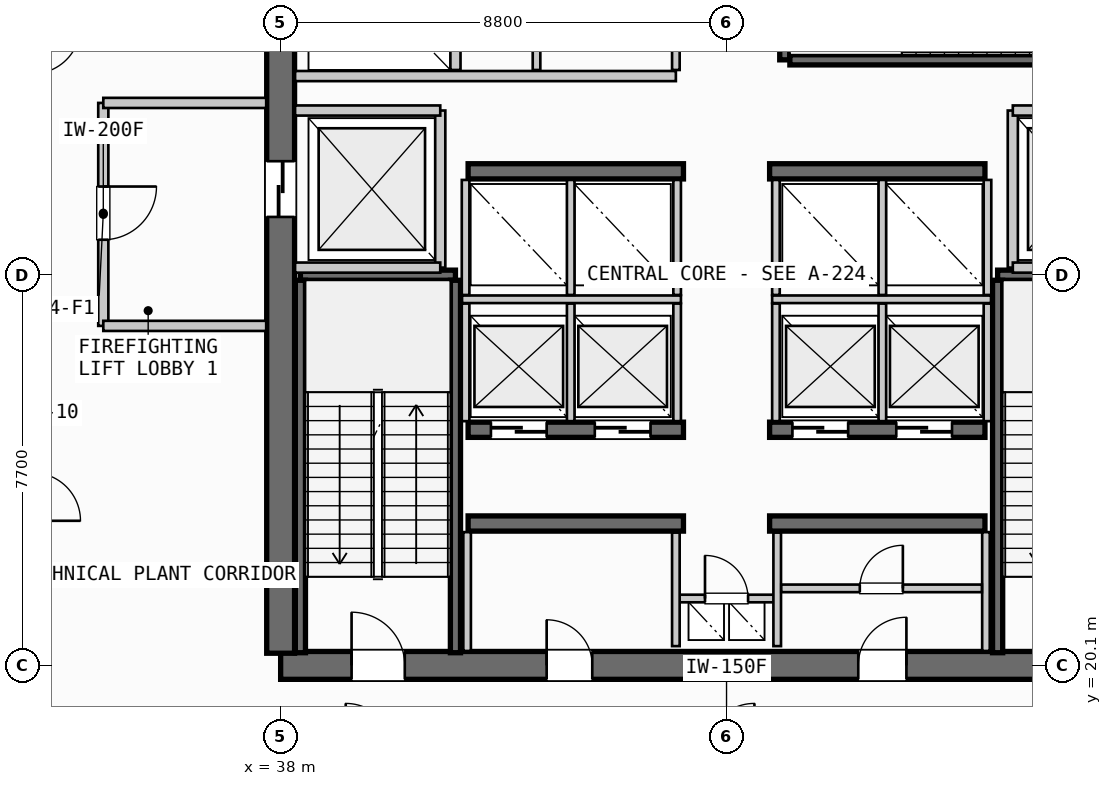
"""IFC4 building model, lengths in metres.
Left out: names, types, materials, properties, quantities, classifications, styles, units other than length and angle.
Written with IfcOpenShell. Run it as: python <this file> out.ifc"""

import sys

from ifc_helpers import new_model, si_unit, direction, frame, frame_2d, origin, place, context, subcontext, project, spatial, rectangle, extrude, source, transform, mapped, element, fill, save


model = new_model("IFC4")
c1 = context("Model", 3, precision=1e-05, world=origin(), true_north=direction((0.0, 1.0)))
c2 = subcontext(c1, "Body", "Model", "MODEL_VIEW")
j1 = project(units=[si_unit("LENGTHUNIT", "METRE"), si_unit("PLANEANGLEUNIT", "RADIAN")], contexts=[c1])
p1 = place(None, origin())
s1 = spatial("IfcSite", under=j1, at=p1, CompositionType="ELEMENT")
p2 = place(p1, origin())
s2 = spatial("IfcBuilding", under=s1, at=p2, CompositionType="ELEMENT")
p3 = place(p2, frame((0.0, 0.0, 171.4)))
s3 = spatial("IfcBuildingStorey", under=s2, at=p3, CompositionType="ELEMENT", Elevation=171.4)
p4 = place(p3, frame((38.0, 20.1, 0.0), z_axis=(0.0, 0.0, 1.0), x_axis=(1.0, 0.0, 0.0)))
e1 = element("IfcWall", 1, at=p4, inside=s3, PredefinedType="SHEAR", context=c2, shape_type="SweptSolid", body=[
    extrude(rectangle(XDim=17.6, YDim=0.55, at=frame_2d((8.8, 0.0))), origin(), (0.0, 0.0, 1.0), 4.58),
])
p5 = place(p4, frame((1.4, 0.0, 0.0)))
e2 = element("IfcOpeningElement", 2, at=p5, cuts=e1, PredefinedType="OPENING", context=c2, shape_type="SweptSolid", body=[
    extrude(rectangle(XDim=1.05, YDim=2.15, at=frame_2d((0.525, 1.075))), frame((0.0, 0.285, 0.0), z_axis=(0.0, -1.0, 0.0), x_axis=(1.0, 0.0, 0.0)), (0.0, 0.0, 1.0), 0.57),
])
p6 = place(p4, frame((15.15, 0.0, 0.0)))
e3 = element("IfcOpeningElement", 3, at=p6, cuts=e1, PredefinedType="OPENING", context=c2, shape_type="SweptSolid", body=[
    extrude(rectangle(XDim=1.05, YDim=2.15, at=frame_2d((0.525, 1.075))), frame((0.0, 0.285, 0.0), z_axis=(0.0, -1.0, 0.0), x_axis=(1.0, 0.0, 0.0)), (0.0, 0.0, 1.0), 0.57),
])
p7 = place(p4, frame((5.25, 0.0, 0.0)))
e4 = element("IfcOpeningElement", 4, at=p7, cuts=e1, PredefinedType="OPENING", context=c2, shape_type="SweptSolid", body=[
    extrude(rectangle(XDim=0.9, YDim=2.15, at=frame_2d((0.45, 1.075))), frame((0.0, 0.285, 0.0), z_axis=(0.0, -1.0, 0.0), x_axis=(1.0, 0.0, 0.0)), (0.0, 0.0, 1.0), 0.57),
])
p8 = place(p4, frame((11.4, 0.0, 0.0)))
e5 = element("IfcOpeningElement", 5, at=p8, cuts=e1, PredefinedType="OPENING", context=c2, shape_type="SweptSolid", body=[
    extrude(rectangle(XDim=0.95, YDim=2.15, at=frame_2d((0.475, 1.075))), frame((0.0, 0.285, 0.0), z_axis=(0.0, -1.0, 0.0), x_axis=(1.0, 0.0, 0.0)), (0.0, 0.0, 1.0), 0.57),
])
p9 = place(p3, frame((38.0, 35.26, 0.0), z_axis=(0.0, 0.0, 1.0), x_axis=(0.0, -1.0, 0.0)))
e6 = element("IfcWall", 6, at=p9, inside=s3, PredefinedType="SHEAR", context=c2, shape_type="SweptSolid", body=[
    extrude(rectangle(XDim=14.92, YDim=0.55, at=frame_2d((7.46, 0.0))), origin(), (0.0, 0.0, 1.0), 4.58),
])
p10 = place(p9, frame((5.21, 0.0, 0.0)))
e7 = element("IfcOpeningElement", 7, at=p10, cuts=e6, PredefinedType="OPENING", context=c2, shape_type="SweptSolid", body=[
    extrude(rectangle(XDim=1.1, YDim=2.2, at=frame_2d((0.55, 1.1))), frame((0.0, 0.285, 0.0), z_axis=(0.0, -1.0, 0.0), x_axis=(1.0, 0.0, 0.0)), (0.0, 0.0, 1.0), 0.57),
])
for number, where, z_axis, x_axis in (
    (8, (41.7, 22.9, 0.0), (0.0, 0.0, 1.0), (1.0, 0.0, 0.0)),
    (9, (47.65, 22.9, 0.0), (0.0, 0.0, 1.0), (1.0, 0.0, 0.0)),
):
    element("IfcWall", number, at=place(p3, frame(where, z_axis=z_axis, x_axis=x_axis)), inside=s3, PredefinedType="SHEAR", context=c2, shape_type="SweptSolid", body=[
        extrude(rectangle(XDim=4.25, YDim=0.3, at=frame_2d((2.125, 0.0))), origin(), (0.0, 0.0, 1.0), 4.58),
    ])
p11 = place(p3, frame((41.7, 24.75, 0.0), z_axis=(0.0, 0.0, 1.0), x_axis=(1.0, 0.0, 0.0)))
e10 = element("IfcWall", 10, at=p11, inside=s3, PredefinedType="SHEAR", context=c2, shape_type="SweptSolid", body=[
    extrude(rectangle(XDim=4.25, YDim=0.3, at=frame_2d((2.125, 0.0))), origin(), (0.0, 0.0, 1.0), 4.58),
])
p12 = place(p11, frame((0.45, 0.0, 0.0)))
e11 = element("IfcOpeningElement", 11, at=p12, cuts=e10, PredefinedType="OPENING", context=c2, shape_type="SweptSolid", body=[
    extrude(rectangle(XDim=1.1, YDim=2.2, at=frame_2d((0.55, 1.1))), frame((0.0, 0.16, 0.0), z_axis=(0.0, -1.0, 0.0), x_axis=(1.0, 0.0, 0.0)), (0.0, 0.0, 1.0), 0.32),
])
p13 = place(p11, frame((2.5, 0.0, 0.0)))
e12 = element("IfcOpeningElement", 12, at=p13, cuts=e10, PredefinedType="OPENING", context=c2, shape_type="SweptSolid", body=[
    extrude(rectangle(XDim=1.1, YDim=2.2, at=frame_2d((0.55, 1.1))), frame((0.0, 0.16, 0.0), z_axis=(0.0, -1.0, 0.0), x_axis=(1.0, 0.0, 0.0)), (0.0, 0.0, 1.0), 0.32),
])
p14 = place(p3, frame((47.65, 24.75, 0.0), z_axis=(0.0, 0.0, 1.0), x_axis=(1.0, 0.0, 0.0)))
e13 = element("IfcWall", 13, at=p14, inside=s3, PredefinedType="SHEAR", context=c2, shape_type="SweptSolid", body=[
    extrude(rectangle(XDim=4.25, YDim=0.3, at=frame_2d((2.125, 0.0))), origin(), (0.0, 0.0, 1.0), 4.58),
])
p15 = place(p14, frame((0.45, 0.0, 0.0)))
e14 = element("IfcOpeningElement", 14, at=p15, cuts=e13, PredefinedType="OPENING", context=c2, shape_type="SweptSolid", body=[
    extrude(rectangle(XDim=1.1, YDim=2.2, at=frame_2d((0.55, 1.1))), frame((0.0, 0.16, 0.0), z_axis=(0.0, -1.0, 0.0), x_axis=(1.0, 0.0, 0.0)), (0.0, 0.0, 1.0), 0.32),
])
p16 = place(p14, frame((2.5, 0.0, 0.0)))
e15 = element("IfcOpeningElement", 15, at=p16, cuts=e13, PredefinedType="OPENING", context=c2, shape_type="SweptSolid", body=[
    extrude(rectangle(XDim=1.1, YDim=2.2, at=frame_2d((0.55, 1.1))), frame((0.0, 0.16, 0.0), z_axis=(0.0, -1.0, 0.0), x_axis=(1.0, 0.0, 0.0)), (0.0, 0.0, 1.0), 0.32),
])
for number, where, z_axis, x_axis in (
    (16, (41.7, 29.85, 0.0), (0.0, 0.0, 1.0), (1.0, 0.0, 0.0)),
    (17, (47.65, 29.85, 0.0), (0.0, 0.0, 1.0), (1.0, 0.0, 0.0)),
):
    element("IfcWall", number, at=place(p3, frame(where, z_axis=z_axis, x_axis=x_axis)), inside=s3, PredefinedType="SHEAR", context=c2, shape_type="SweptSolid", body=[
        extrude(rectangle(XDim=4.25, YDim=0.3, at=frame_2d((2.125, 0.0))), origin(), (0.0, 0.0, 1.0), 4.58),
    ])
p17 = place(p3, frame((38.39, 27.8, 0.0), z_axis=(0.0, 0.0, 1.0), x_axis=(1.0, 0.0, 0.0)))
e18 = element("IfcWall", 18, at=p17, inside=s3, PredefinedType="SHEAR", context=c2, shape_type="SweptSolid", body=[
    extrude(rectangle(XDim=3.06, YDim=0.2, at=frame_2d((1.53, 0.0))), origin(), (0.0, 0.0, 1.0), 4.58),
])
for number, where, z_axis, x_axis in (
    (19, (41.45, 27.7, 0.0), (0.0, 0.0, 1.0), (0.0, -1.0, 0.0)),
    (20, (38.39, 20.35, 0.0), (0.0, 0.0, 1.0), (0.0, 1.0, 0.0)),
):
    element("IfcWall", number, at=place(p3, frame(where, z_axis=z_axis, x_axis=x_axis)), inside=s3, PredefinedType="SHEAR", context=c2, shape_type="SweptSolid", body=[
        extrude(rectangle(XDim=7.35, YDim=0.2, at=frame_2d((3.675, 0.0))), origin(), (0.0, 0.0, 1.0), 4.58),
    ])
p18 = place(p3, frame((52.15, 27.8, 0.0), z_axis=(0.0, 0.0, 1.0), x_axis=(1.0, 0.0, 0.0)))
e21 = element("IfcWall", 21, at=p18, inside=s3, PredefinedType="SHEAR", context=c2, shape_type="SweptSolid", body=[
    extrude(rectangle(XDim=3.06, YDim=0.2, at=frame_2d((1.53, 0.0))), origin(), (0.0, 0.0, 1.0), 4.58),
])
p19 = place(p3, frame((52.15, 20.35, 0.0), z_axis=(0.0, 0.0, 1.0), x_axis=(0.0, 1.0, 0.0)))
e22 = element("IfcWall", 22, at=p19, inside=s3, PredefinedType="SHEAR", context=c2, shape_type="SweptSolid", body=[
    extrude(rectangle(XDim=7.35, YDim=0.2, at=frame_2d((3.675, 0.0))), origin(), (0.0, 0.0, 1.0), 4.58),
])
p20 = place(p3, frame((47.95, 32.05, 0.0), z_axis=(0.0, 0.0, 1.0), x_axis=(0.0, 1.0, 0.0)))
e23 = element("IfcWall", 23, at=p20, inside=s3, PredefinedType="SHEAR", context=c2, shape_type="SweptSolid", body=[
    extrude(rectangle(XDim=3.06, YDim=0.2, at=frame_2d((1.53, 0.0))), origin(), (0.0, 0.0, 1.0), 4.58),
])
p21 = place(p3, frame((55.4, 32.05, 0.0), z_axis=(0.0, 0.0, 1.0), x_axis=(-1.0, 0.0, 0.0)))
e24 = element("IfcWall", 24, at=p21, inside=s3, PredefinedType="SHEAR", context=c2, shape_type="SweptSolid", body=[
    extrude(rectangle(XDim=7.35, YDim=0.2, at=frame_2d((3.675, 0.0))), origin(), (0.0, 0.0, 1.0), 4.58),
])
p22 = place(p3, frame((45.8, 21.42, 0.0), z_axis=(0.0, 0.0, 1.0), x_axis=(1.0, 0.0, 0.0)))
e25 = element("IfcWall", 25, at=p22, inside=s3, PredefinedType="PARTITIONING", context=c2, shape_type="SweptSolid", body=[
    extrude(rectangle(XDim=2.0, YDim=0.15, at=frame_2d((1.0, 0.0))), origin(), (0.0, 0.0, 1.0), 2.355),
])
p23 = place(p22, frame((0.575, 0.0, 0.0)))
e26 = element("IfcOpeningElement", 26, at=p23, cuts=e25, PredefinedType="OPENING", context=c2, shape_type="SweptSolid", body=[
    extrude(rectangle(XDim=0.85, YDim=2.15, at=frame_2d((0.425, 1.075))), frame((0.0, 0.085, 0.0), z_axis=(0.0, -1.0, 0.0), x_axis=(1.0, 0.0, 0.0)), (0.0, 0.0, 1.0), 0.17),
])
for number, where, z_axis, x_axis in (
    (27, (45.8, 20.48, 0.0), (0.0, 0.0, 1.0), (0.0, 1.0, 0.0)),
    (28, (47.8, 20.48, 0.0), (0.0, 0.0, 1.0), (0.0, 1.0, 0.0)),
):
    element("IfcWall", number, at=place(p3, frame(where, z_axis=z_axis, x_axis=x_axis)), inside=s3, PredefinedType="PARTITIONING", context=c2, shape_type="SweptSolid", body=[
        extrude(rectangle(XDim=2.24, YDim=0.15, at=frame_2d((1.12, 0.0))), origin(), (0.0, 0.0, 1.0), 2.355),
    ])
p24 = place(p3, frame((41.15, 27.95, 0.0), z_axis=(0.0, 0.0, 1.0), x_axis=(0.0, 1.0, 0.0)))
e29 = element("IfcWall", 29, at=p24, inside=s3, PredefinedType="PARTITIONING", context=c2, shape_type="SweptSolid", body=[
    extrude(rectangle(XDim=3.1, YDim=0.2, at=frame_2d((1.55, 0.0))), origin(), (0.0, 0.0, 1.0), 2.355),
])
for number, where, z_axis, x_axis in (
    (30, (38.285, 27.95, 0.0), (0.0, 0.0, 1.0), (1.0, 0.0, 0.0)),
    (31, (38.285, 31.05, 0.0), (0.0, 0.0, 1.0), (1.0, 0.0, 0.0)),
):
    element("IfcWall", number, at=place(p3, frame(where, z_axis=z_axis, x_axis=x_axis)), inside=s3, PredefinedType="PARTITIONING", context=c2, shape_type="SweptSolid", body=[
        extrude(rectangle(XDim=2.865, YDim=0.2, at=frame_2d((1.433, 0.0))), origin(), (0.0, 0.0, 1.0), 2.355),
    ])
p25 = place(p3, frame((34.5, 31.2, 0.0), z_axis=(0.0, 0.0, 1.0), x_axis=(0.0, -1.0, 0.0)))
e32 = element("IfcWall", 32, at=p25, inside=s3, PredefinedType="PARTITIONING", context=c2, shape_type="SweptSolid", body=[
    extrude(rectangle(XDim=4.4, YDim=0.2, at=frame_2d((2.2, 0.0))), origin(), (0.0, 0.0, 1.0), 2.355),
])
p26 = place(p25, frame((1.65, 0.0, 0.0)))
e33 = element("IfcOpeningElement", 33, at=p26, cuts=e32, PredefinedType="OPENING", context=c2, shape_type="SweptSolid", body=[
    extrude(rectangle(XDim=1.05, YDim=2.15, at=frame_2d((0.525, 1.075))), frame((0.0, 0.11, 0.0), z_axis=(0.0, -1.0, 0.0), x_axis=(1.0, 0.0, 0.0)), (0.0, 0.0, 1.0), 0.22),
])
for number, where, z_axis, x_axis in (
    (34, (34.5, 26.8, 0.0), (0.0, 0.0, 1.0), (1.0, 0.0, 0.0)),
    (35, (34.5, 31.2, 0.0), (0.0, 0.0, 1.0), (1.0, 0.0, 0.0)),
):
    element("IfcWall", number, at=place(p3, frame(where, z_axis=z_axis, x_axis=x_axis)), inside=s3, PredefinedType="PARTITIONING", context=c2, shape_type="SweptSolid", body=[
        extrude(rectangle(XDim=3.215, YDim=0.2, at=frame_2d((1.607, 0.0))), origin(), (0.0, 0.0, 1.0), 2.355),
    ])
p27 = place(p3, frame((52.45, 27.95, 0.0), z_axis=(0.0, 0.0, 1.0), x_axis=(0.0, 1.0, 0.0)))
e36 = element("IfcWall", 36, at=p27, inside=s3, PredefinedType="PARTITIONING", context=c2, shape_type="SweptSolid", body=[
    extrude(rectangle(XDim=3.1, YDim=0.2, at=frame_2d((1.55, 0.0))), origin(), (0.0, 0.0, 1.0), 2.355),
])
for number, where, z_axis, x_axis in (
    (37, (52.45, 27.95, 0.0), (0.0, 0.0, 1.0), (1.0, 0.0, 0.0)),
    (38, (52.45, 31.05, 0.0), (0.0, 0.0, 1.0), (1.0, 0.0, 0.0)),
):
    element("IfcWall", number, at=place(p3, frame(where, z_axis=z_axis, x_axis=x_axis)), inside=s3, PredefinedType="PARTITIONING", context=c2, shape_type="SweptSolid", body=[
        extrude(rectangle(XDim=2.865, YDim=0.2, at=frame_2d((1.433, 0.0))), origin(), (0.0, 0.0, 1.0), 2.355),
    ])
for number, where, z_axis, x_axis in (
    (39, (41.68, 20.385, 0.0), (0.0, 0.0, 1.0), (0.0, 1.0, 0.0)),
    (40, (51.92, 20.385, 0.0), (0.0, 0.0, 1.0), (0.0, 1.0, 0.0)),
):
    element("IfcWall", number, at=place(p3, frame(where, z_axis=z_axis, x_axis=x_axis)), inside=s3, PredefinedType="PARTITIONING", context=c2, shape_type="SweptSolid", body=[
        extrude(rectangle(XDim=2.345, YDim=0.15, at=frame_2d((1.172, 0.0))), origin(), (0.0, 0.0, 1.0), 2.355),
    ])
p28 = place(p3, frame((47.88, 21.62, 0.0), z_axis=(0.0, 0.0, 1.0), x_axis=(1.0, 0.0, 0.0)))
e41 = element("IfcWall", 41, at=p28, inside=s3, PredefinedType="PARTITIONING", context=c2, shape_type="SweptSolid", body=[
    extrude(rectangle(XDim=3.96, YDim=0.15, at=frame_2d((1.98, 0.0))), origin(), (0.0, 0.0, 1.0), 2.355),
])
p29 = place(p28, frame((1.55, 0.0, 0.0)))
e42 = element("IfcOpeningElement", 42, at=p29, cuts=e41, PredefinedType="OPENING", context=c2, shape_type="SweptSolid", body=[
    extrude(rectangle(XDim=0.85, YDim=2.15, at=frame_2d((0.425, 1.075))), frame((0.0, 0.085, 0.0), z_axis=(0.0, -1.0, 0.0), x_axis=(1.0, 0.0, 0.0)), (0.0, 0.0, 1.0), 0.17),
])
p30 = place(p3, frame((41.58, 27.325, 0.0), z_axis=(0.0, 0.0, 1.0), x_axis=(1.0, 0.0, 0.0)))
e43 = element("IfcWall", 43, at=p30, inside=s3, PredefinedType="PARTITIONING", context=c2, shape_type="SweptSolid", body=[
    extrude(rectangle(XDim=4.32, YDim=0.15, at=frame_2d((2.16, 0.0))), origin(), (0.0, 0.0, 1.0), 2.355),
])
p31 = place(p3, frame((47.7, 27.325, 0.0), z_axis=(0.0, 0.0, 1.0), x_axis=(1.0, 0.0, 0.0)))
e44 = element("IfcWall", 44, at=p31, inside=s3, PredefinedType="PARTITIONING", context=c2, shape_type="SweptSolid", body=[
    extrude(rectangle(XDim=4.32, YDim=0.15, at=frame_2d((2.16, 0.0))), origin(), (0.0, 0.0, 1.0), 2.355),
])
for number, where, z_axis, x_axis in (
    (45, (41.65, 24.92, 0.0), (0.0, 0.0, 1.0), (0.0, 1.0, 0.0)),
    (46, (43.725, 24.92, 0.0), (0.0, 0.0, 1.0), (0.0, 1.0, 0.0)),
    (47, (45.825, 24.92, 0.0), (0.0, 0.0, 1.0), (0.0, 1.0, 0.0)),
    (48, (47.775, 24.92, 0.0), (0.0, 0.0, 1.0), (0.0, 1.0, 0.0)),
    (49, (49.875, 24.92, 0.0), (0.0, 0.0, 1.0), (0.0, 1.0, 0.0)),
    (50, (51.95, 24.92, 0.0), (0.0, 0.0, 1.0), (0.0, 1.0, 0.0)),
):
    element("IfcWall", number, at=place(p3, frame(where, z_axis=z_axis, x_axis=x_axis)), inside=s3, PredefinedType="PARTITIONING", context=c2, shape_type="SweptSolid", body=[
        extrude(rectangle(XDim=2.32, YDim=0.15, at=frame_2d((1.16, 0.0))), origin(), (0.0, 0.0, 1.0), 2.355),
    ])
for number, where, z_axis, x_axis in (
    (51, (41.65, 27.41, 0.0), (0.0, 0.0, 1.0), (0.0, 1.0, 0.0)),
    (52, (43.725, 27.41, 0.0), (0.0, 0.0, 1.0), (0.0, 1.0, 0.0)),
    (53, (45.825, 27.41, 0.0), (0.0, 0.0, 1.0), (0.0, 1.0, 0.0)),
    (54, (47.775, 27.41, 0.0), (0.0, 0.0, 1.0), (0.0, 1.0, 0.0)),
    (55, (49.875, 27.41, 0.0), (0.0, 0.0, 1.0), (0.0, 1.0, 0.0)),
    (56, (51.95, 27.41, 0.0), (0.0, 0.0, 1.0), (0.0, 1.0, 0.0)),
):
    element("IfcWall", number, at=place(p3, frame(where, z_axis=z_axis, x_axis=x_axis)), inside=s3, PredefinedType="PARTITIONING", context=c2, shape_type="SweptSolid", body=[
        extrude(rectangle(XDim=2.27, YDim=0.15, at=frame_2d((1.135, 0.0))), origin(), (0.0, 0.0, 1.0), 2.355),
    ])
p32 = place(p3, frame((41.45, 31.85, 0.0), z_axis=(0.0, 0.0, 1.0), x_axis=(0.0, 1.0, 0.0)))
e57 = element("IfcWall", 57, at=p32, inside=s3, PredefinedType="PARTITIONING", context=c2, shape_type="SweptSolid", body=[
    extrude(rectangle(XDim=3.365, YDim=0.2, at=frame_2d((1.683, 0.0))), origin(), (0.0, 0.0, 1.0), 2.355),
])
p33 = place(p3, frame((38.285, 31.73, 0.0), z_axis=(0.0, 0.0, 1.0), x_axis=(1.0, 0.0, 0.0)))
e58 = element("IfcWall", 58, at=p33, inside=s3, PredefinedType="PARTITIONING", context=c2, shape_type="SweptSolid", body=[
    extrude(rectangle(XDim=7.515, YDim=0.2, at=frame_2d((3.758, 0.0))), origin(), (0.0, 0.0, 1.0), 2.355),
])
p34 = place(p3, frame((45.8, 31.85, 0.0), z_axis=(0.0, 0.0, 1.0), x_axis=(0.0, 1.0, 0.0)))
e59 = element("IfcWall", 59, at=p34, inside=s3, PredefinedType="PARTITIONING", context=c2, shape_type="SweptSolid", body=[
    extrude(rectangle(XDim=3.365, YDim=0.15, at=frame_2d((1.683, 0.0))), origin(), (0.0, 0.0, 1.0), 2.355),
])
p35 = place(p3, frame((43.05, 31.85, 0.0), z_axis=(0.0, 0.0, 1.0), x_axis=(0.0, 1.0, 0.0)))
e60 = element("IfcWall", 60, at=p35, inside=s3, PredefinedType="PLUMBINGWALL", context=c2, shape_type="SweptSolid", body=[
    extrude(rectangle(XDim=3.365, YDim=0.15, at=frame_2d((1.683, 0.0))), origin(), (0.0, 0.0, 1.0), 2.355),
])
m1 = source(origin(), c2, "Body", "SweptSolid", [
    extrude(rectangle(XDim=1.05, YDim=2.15, at=frame_2d((0.525, 1.075))), frame((0.0, 0.025, 0.0), z_axis=(0.0, -1.0, 0.0), x_axis=(1.0, 0.0, 0.0)), (0.0, 0.0, 1.0), 0.05),
])
p36 = place(p5, origin())
e61 = element("IfcDoor", 61, at=p36, inside=s3, OperationType="SINGLE_SWING_LEFT", PredefinedType="DOOR", context=c2, shape_type="MappedRepresentation", body=[
    mapped(m1, transform((0.0, 0.0, 0.0), scale=1.0)),
])
fill(e2, e61)
m2 = source(origin(), c2, "Body", "SweptSolid", [
    extrude(rectangle(XDim=1.1, YDim=2.2, at=frame_2d((0.55, 1.1))), frame((0.0, 0.025, 0.0), z_axis=(0.0, -1.0, 0.0), x_axis=(1.0, 0.0, 0.0)), (0.0, 0.0, 1.0), 0.05),
])
p37 = place(p10, origin())
e62 = element("IfcDoor", 62, at=p37, inside=s3, OperationType="SLIDING_TO_LEFT", PredefinedType="DOOR", context=c2, shape_type="MappedRepresentation", body=[
    mapped(m2, transform((0.0, 0.0, 0.0), scale=1.0)),
])
fill(e7, e62)
m3 = source(origin(), c2, "Body", "SweptSolid", [
    extrude(rectangle(XDim=0.9, YDim=2.15, at=frame_2d((0.45, 1.075))), frame((0.0, 0.025, 0.0), z_axis=(0.0, -1.0, 0.0), x_axis=(1.0, 0.0, 0.0)), (0.0, 0.0, 1.0), 0.05),
])
p38 = place(p7, origin())
e63 = element("IfcDoor", 63, at=p38, inside=s3, OperationType="SINGLE_SWING_LEFT", PredefinedType="DOOR", context=c2, shape_type="MappedRepresentation", body=[
    mapped(m3, transform((0.0, 0.0, 0.0), scale=1.0)),
])
fill(e4, e63)
m4 = source(origin(), c2, "Body", "SweptSolid", [
    extrude(rectangle(XDim=0.95, YDim=2.15, at=frame_2d((0.475, 1.075))), frame((0.0, 0.025, 0.0), z_axis=(0.0, -1.0, 0.0), x_axis=(1.0, 0.0, 0.0)), (0.0, 0.0, 1.0), 0.05),
])
p39 = place(p8, origin())
e64 = element("IfcDoor", 64, at=p39, inside=s3, OperationType="SINGLE_SWING_RIGHT", PredefinedType="DOOR", context=c2, shape_type="MappedRepresentation", body=[
    mapped(m4, transform((0.0, 0.0, 0.0), scale=1.0)),
])
fill(e5, e64)
p40 = place(p12, origin())
e65 = element("IfcDoor", 65, at=p40, inside=s3, OperationType="SLIDING_TO_RIGHT", PredefinedType="DOOR", context=c2, shape_type="MappedRepresentation", body=[
    mapped(m2, transform((0.0, 0.0, 0.0), scale=1.0)),
])
fill(e11, e65)
p41 = place(p13, origin())
e66 = element("IfcDoor", 66, at=p41, inside=s3, OperationType="SLIDING_TO_RIGHT", PredefinedType="DOOR", context=c2, shape_type="MappedRepresentation", body=[
    mapped(m2, transform((0.0, 0.0, 0.0), scale=1.0)),
])
fill(e12, e66)
p42 = place(p15, origin())
e67 = element("IfcDoor", 67, at=p42, inside=s3, OperationType="SLIDING_TO_RIGHT", PredefinedType="DOOR", context=c2, shape_type="MappedRepresentation", body=[
    mapped(m2, transform((0.0, 0.0, 0.0), scale=1.0)),
])
fill(e14, e67)
p43 = place(p16, origin())
e68 = element("IfcDoor", 68, at=p43, inside=s3, OperationType="SLIDING_TO_RIGHT", PredefinedType="DOOR", context=c2, shape_type="MappedRepresentation", body=[
    mapped(m2, transform((0.0, 0.0, 0.0), scale=1.0)),
])
fill(e15, e68)
p44 = place(p26, origin())
e69 = element("IfcDoor", 69, at=p44, inside=s3, OperationType="SINGLE_SWING_LEFT", PredefinedType="DOOR", context=c2, shape_type="MappedRepresentation", body=[
    mapped(m1, transform((0.0, 0.0, 0.0), scale=1.0)),
])
fill(e33, e69)
m5 = source(origin(), c2, "Body", "SweptSolid", [
    extrude(rectangle(XDim=0.85, YDim=2.15, at=frame_2d((0.425, 1.075))), frame((0.0, 0.025, 0.0), z_axis=(0.0, -1.0, 0.0), x_axis=(1.0, 0.0, 0.0)), (0.0, 0.0, 1.0), 0.05),
])
p45 = place(p29, origin())
e70 = element("IfcDoor", 70, at=p45, inside=s3, OperationType="SINGLE_SWING_RIGHT", PredefinedType="DOOR", context=c2, shape_type="MappedRepresentation", body=[
    mapped(m5, transform((0.0, 0.0, 0.0), scale=1.0)),
])
fill(e42, e70)
p46 = place(p23, origin())
e71 = element("IfcDoor", 71, at=p46, inside=s3, OperationType="SINGLE_SWING_LEFT", PredefinedType="DOOR", context=c2, shape_type="MappedRepresentation", body=[
    mapped(m5, transform((0.0, 0.0, 0.0), scale=1.0)),
])
fill(e26, e71)
save(model, sys.argv[1])
